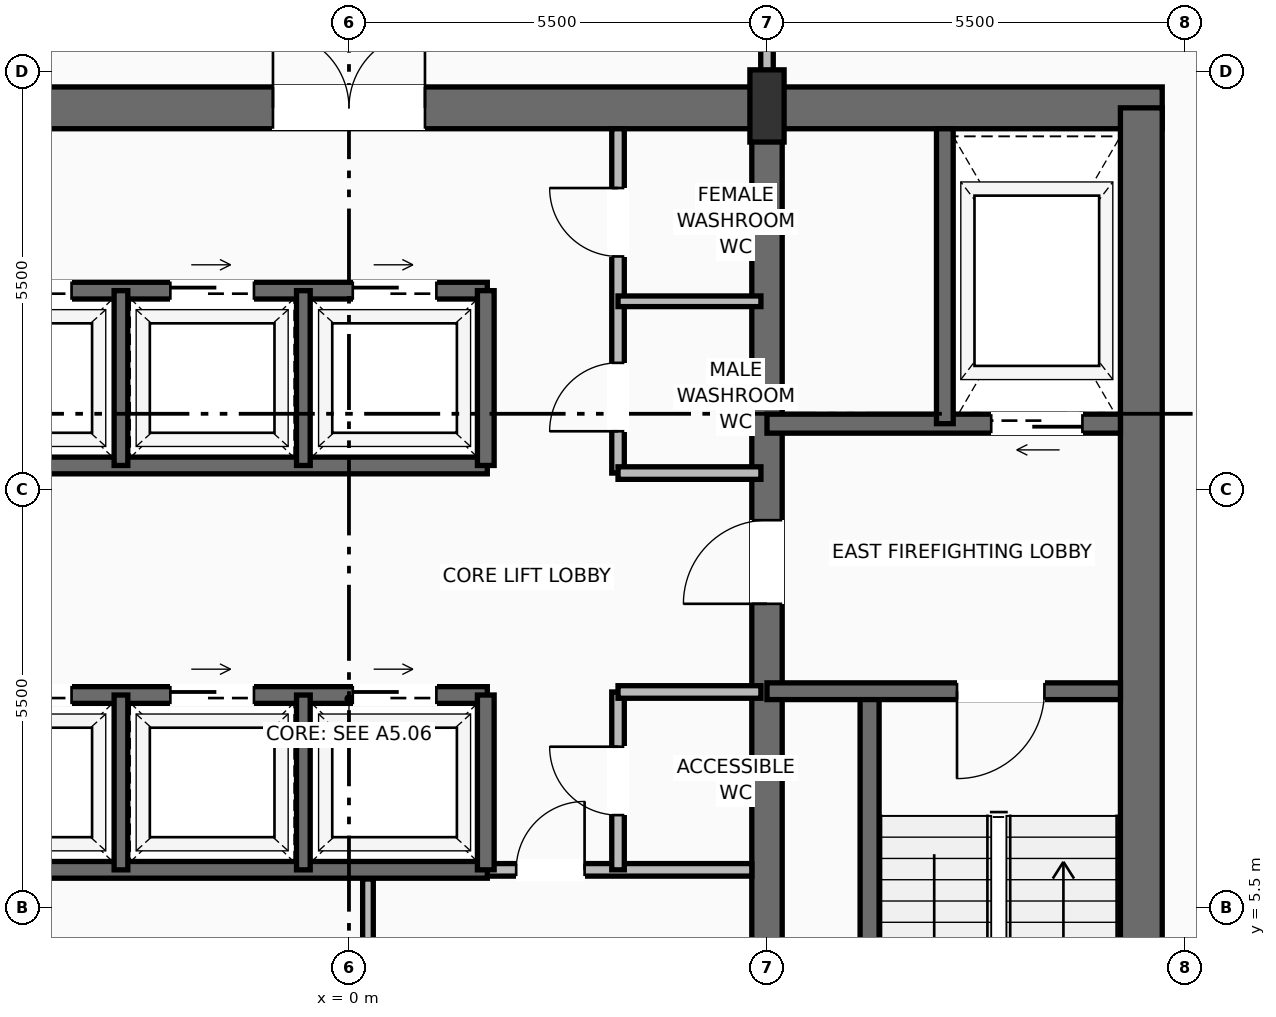
"""IFC4 building model, lengths in metres.
Left out: names, types, materials, properties, quantities, classifications, styles, units other than length and angle.
Written with IfcOpenShell. Run it as: python <this file> out.ifc"""

import sys

from ifc_helpers import new_model, si_unit, direction, frame, frame_2d, origin, origin_2d, place, context, subcontext, project, spatial, rectangle, extrude, source, transform, mapped, element, fill, save


model = new_model("IFC4")
c1 = context("Model", 3, precision=1e-05, world=origin(), true_north=direction((0.0, 1.0)))
c2 = subcontext(c1, "Body", "Model", "MODEL_VIEW")
j1 = project(units=[si_unit("LENGTHUNIT", "METRE"), si_unit("PLANEANGLEUNIT", "RADIAN")], contexts=[c1])
p1 = place(None, origin())
s1 = spatial("IfcSite", under=j1, at=p1, CompositionType="ELEMENT")
p2 = place(p1, origin())
s2 = spatial("IfcBuilding", under=s1, at=p2, CompositionType="ELEMENT")
p3 = place(p2, frame((0.0, 0.0, 215.4)))
s3 = spatial("IfcBuildingStorey", under=s2, at=p3, CompositionType="ELEMENT", Elevation=215.4)
p4 = place(p3, frame((-10.7, 16.025, 0.0), z_axis=(0.0, 0.0, 1.0), x_axis=(1.0, 0.0, 0.0)))
e1 = element("IfcWall", 1, at=p4, inside=s3, PredefinedType="SHEAR", context=c2, shape_type="SweptSolid", body=[
    extrude(rectangle(XDim=21.4, YDim=0.55, at=frame_2d((10.7, 0.0))), origin(), (0.0, 0.0, 1.0), 4.39),
])
p5 = place(p4, frame((3.27, 0.0, 0.0)))
e2 = element("IfcOpeningElement", 2, at=p5, cuts=e1, PredefinedType="OPENING", context=c2, shape_type="SweptSolid", body=[
    extrude(rectangle(XDim=1.3, YDim=2.3, at=frame_2d((0.65, 1.15))), frame((0.0, 0.285, 0.0), z_axis=(0.0, -1.0, 0.0), x_axis=(1.0, 0.0, 0.0)), (0.0, 0.0, 1.0), 0.57),
])
p6 = place(p4, frame((9.7, 0.0, 0.0)))
e3 = element("IfcOpeningElement", 3, at=p6, cuts=e1, PredefinedType="OPENING", context=c2, shape_type="SweptSolid", body=[
    extrude(rectangle(XDim=2.0, YDim=2.4, at=frame_2d((1.0, 1.2))), frame((0.0, 0.285, 0.0), z_axis=(0.0, -1.0, 0.0), x_axis=(1.0, 0.0, 0.0)), (0.0, 0.0, 1.0), 0.57),
])
p7 = place(p3, frame((10.425, 0.575, 0.0), z_axis=(0.0, 0.0, 1.0), x_axis=(0.0, 1.0, 0.0)))
e4 = element("IfcWall", 4, at=p7, inside=s3, PredefinedType="SHEAR", context=c2, shape_type="SweptSolid", body=[
    extrude(rectangle(XDim=15.45, YDim=0.55, at=frame_2d((7.725, 0.0))), origin(), (0.0, 0.0, 1.0), 4.39),
])
p8 = place(p3, frame((5.5, 0.575, 0.0), z_axis=(0.0, 0.0, 1.0), x_axis=(0.0, 1.0, 0.0)))
e5 = element("IfcWall", 5, at=p8, inside=s3, PredefinedType="SHEAR", context=c2, shape_type="SweptSolid", body=[
    extrude(rectangle(XDim=15.45, YDim=0.4, at=frame_2d((7.725, 0.0))), origin(), (0.0, 0.0, 1.0), 4.39),
])
p9 = place(p8, frame((8.925, 0.0, 0.0)))
e6 = element("IfcOpeningElement", 6, at=p9, cuts=e5, PredefinedType="OPENING", context=c2, shape_type="SweptSolid", body=[
    extrude(rectangle(XDim=1.1, YDim=2.2, at=frame_2d((0.55, 1.1))), frame((0.0, 0.21, 0.0), z_axis=(0.0, -1.0, 0.0), x_axis=(1.0, 0.0, 0.0)), (0.0, 0.0, 1.0), 0.42),
])
m1 = source(origin(), c2, "Body", "SweptSolid", [
    extrude(rectangle(XDim=0.45, YDim=0.95, at=origin_2d()), origin(), (0.0, 0.0, 1.0), 4.6),
])
p10 = place(p3, frame((5.5, 16.05, 0.0), z_axis=(0.0, 0.0, 1.0), x_axis=(1.0, 0.0, 0.0)))
e7 = element("IfcColumn", 7, at=p10, inside=s3, PredefinedType="PILASTER", context=c2, shape_type="MappedRepresentation", body=[
    mapped(m1, transform((0.0, 0.0, 0.0), scale=1.0)),
])
p11 = place(p3, frame((9.102, 32.238, 0.0), z_axis=(0.0, 0.0, 1.0), x_axis=(0.531549047002, -0.847027514684, 0.0)))
e8 = element("IfcWall", 8, at=p11, inside=s3, PredefinedType="SOLIDWALL", context=c2, shape_type="SweptSolid", body=[
    extrude(rectangle(XDim=19.313, YDim=0.28, at=frame_2d((9.657, 0.0))), origin(), (0.0, 0.0, 1.0), 3.97),
])
p12 = place(p11, frame((4.635, 0.0, 0.0)))
e9 = element("IfcOpeningElement", 9, at=p12, cuts=e8, PredefinedType="OPENING", context=c2, shape_type="SweptSolid", body=[
    extrude(rectangle(XDim=1.6, YDim=2.35, at=frame_2d((0.8, 1.175))), frame((0.0, 0.15, 0.0), z_axis=(0.0, -1.0, 0.0), x_axis=(1.0, 0.0, 0.0)), (0.0, 0.0, 1.0), 0.3),
])
p13 = place(p11, frame((13.133, 0.0, 0.9)))
e10 = element("IfcOpeningElement", 10, at=p13, cuts=e8, PredefinedType="OPENING", context=c2, shape_type="SweptSolid", body=[
    extrude(rectangle(XDim=2.0, YDim=1.55, at=frame_2d((1.0, 0.775))), frame((0.0, 0.15, 0.0), z_axis=(0.0, -1.0, 0.0), x_axis=(1.0, 0.0, 0.0)), (0.0, 0.0, 1.0), 0.3),
])
p14 = place(p3, frame((6.85, 0.85, 0.0), z_axis=(0.0, 0.0, 1.0), x_axis=(0.0, 1.0, 0.0)))
e11 = element("IfcWall", 11, at=p14, inside=s3, PredefinedType="SOLIDWALL", context=c2, shape_type="SweptSolid", body=[
    extrude(rectangle(XDim=7.5, YDim=0.25, at=frame_2d((3.75, 0.0))), origin(), (0.0, 0.0, 1.0), 4.39),
])
p15 = place(p3, frame((10.15, 8.35, 0.0), z_axis=(0.0, 0.0, 1.0), x_axis=(-1.0, 0.0, 0.0)))
e12 = element("IfcWall", 12, at=p15, inside=s3, PredefinedType="SOLIDWALL", context=c2, shape_type="SweptSolid", body=[
    extrude(rectangle(XDim=4.65, YDim=0.22, at=frame_2d((2.325, 0.0))), origin(), (0.0, 0.0, 1.0), 4.39),
])
p16 = place(p15, frame((1.0, 0.0, 0.0)))
e13 = element("IfcOpeningElement", 13, at=p16, cuts=e12, PredefinedType="OPENING", context=c2, shape_type="SweptSolid", body=[
    extrude(rectangle(XDim=1.15, YDim=2.2, at=frame_2d((0.575, 1.1))), frame((0.0, 0.12, 0.0), z_axis=(0.0, -1.0, 0.0), x_axis=(1.0, 0.0, 0.0)), (0.0, 0.0, 1.0), 0.24),
])
p17 = place(p3, frame((10.15, 11.87, 0.0), z_axis=(0.0, 0.0, 1.0), x_axis=(-1.0, 0.0, 0.0)))
e14 = element("IfcWall", 14, at=p17, inside=s3, PredefinedType="SOLIDWALL", context=c2, shape_type="SweptSolid", body=[
    extrude(rectangle(XDim=4.65, YDim=0.25, at=frame_2d((2.325, 0.0))), origin(), (0.0, 0.0, 1.0), 4.39),
])
p18 = place(p17, frame((0.5, 0.0, 0.0)))
e15 = element("IfcOpeningElement", 15, at=p18, cuts=e14, PredefinedType="OPENING", context=c2, shape_type="SweptSolid", body=[
    extrude(rectangle(XDim=1.2, YDim=2.25, at=frame_2d((0.6, 1.125))), frame((0.0, 0.135, 0.0), z_axis=(0.0, -1.0, 0.0), x_axis=(1.0, 0.0, 0.0)), (0.0, 0.0, 1.0), 0.27),
])
p19 = place(p3, frame((7.84, 11.87, 0.0), z_axis=(0.0, 0.0, 1.0), x_axis=(0.0, 1.0, 0.0)))
e16 = element("IfcWall", 16, at=p19, inside=s3, PredefinedType="SOLIDWALL", context=c2, shape_type="SweptSolid", body=[
    extrude(rectangle(XDim=3.88, YDim=0.22, at=frame_2d((1.94, 0.0))), origin(), (0.0, 0.0, 1.0), 4.39),
])
p20 = place(p3, frame((1.82, 6.0, 0.0), z_axis=(0.0, 0.0, 1.0), x_axis=(1.0, 0.0, 0.0)))
e17 = element("IfcWall", 17, at=p20, inside=s3, PredefinedType="PARTITIONING", context=c2, shape_type="SweptSolid", body=[
    extrude(rectangle(XDim=3.48, YDim=0.165, at=frame_2d((1.74, 0.0))), origin(), (0.0, 0.0, 1.0), 4.382),
])
p21 = place(p20, frame((0.38, 0.0, 0.0)))
e18 = element("IfcOpeningElement", 18, at=p21, cuts=e17, PredefinedType="OPENING", context=c2, shape_type="SweptSolid", body=[
    extrude(rectangle(XDim=0.9, YDim=2.1, at=frame_2d((0.45, 1.05))), frame((0.0, 0.093, 0.0), z_axis=(0.0, -1.0, 0.0), x_axis=(1.0, 0.0, 0.0)), (0.0, 0.0, 1.0), 0.185),
])
p22 = place(p3, frame((0.25, 0.85, 0.0), z_axis=(0.0, 0.0, 1.0), x_axis=(0.0, 1.0, 0.0)))
e19 = element("IfcWall", 19, at=p22, inside=s3, PredefinedType="PARTITIONING", context=c2, shape_type="SweptSolid", body=[
    extrude(rectangle(XDim=5.03, YDim=0.14, at=frame_2d((2.515, 0.0))), origin(), (0.0, 0.0, 1.0), 4.382),
])
p23 = place(p22, frame((2.1, 0.0, 0.0)))
e20 = element("IfcOpeningElement", 20, at=p23, cuts=e19, PredefinedType="OPENING", context=c2, shape_type="SweptSolid", body=[
    extrude(rectangle(XDim=0.9, YDim=2.1, at=frame_2d((0.45, 1.05))), frame((0.0, 0.08, 0.0), z_axis=(0.0, -1.0, 0.0), x_axis=(1.0, 0.0, 0.0)), (0.0, 0.0, 1.0), 0.16),
])
p24 = place(p3, frame((3.54, 6.0, 0.0), z_axis=(0.0, 0.0, 1.0), x_axis=(0.0, 1.0, 0.0)))
e21 = element("IfcWall", 21, at=p24, inside=s3, PredefinedType="PARTITIONING", context=c2, shape_type="SweptSolid", body=[
    extrude(rectangle(XDim=2.34, YDim=0.165, at=frame_2d((1.17, 0.0))), origin(), (0.0, 0.0, 1.0), 4.382),
])
p25 = place(p24, frame((0.72, 0.0, 0.0)))
e22 = element("IfcOpeningElement", 22, at=p25, cuts=e21, PredefinedType="OPENING", context=c2, shape_type="SweptSolid", body=[
    extrude(rectangle(XDim=0.9, YDim=2.1, at=frame_2d((0.45, 1.05))), frame((0.0, 0.093, 0.0), z_axis=(0.0, -1.0, 0.0), x_axis=(1.0, 0.0, 0.0)), (0.0, 0.0, 1.0), 0.185),
])
p26 = place(p3, frame((3.54, 8.34, 0.0), z_axis=(0.0, 0.0, 1.0), x_axis=(1.0, 0.0, 0.0)))
e23 = element("IfcWall", 23, at=p26, inside=s3, PredefinedType="PARTITIONING", context=c2, shape_type="SweptSolid", body=[
    extrude(rectangle(XDim=1.88, YDim=0.165, at=frame_2d((0.94, 0.0))), origin(), (0.0, 0.0, 1.0), 4.382),
])
p27 = place(p3, frame((-5.5, 6.0, 0.0), z_axis=(0.0, 0.0, 1.0), x_axis=(1.0, 0.0, 0.0)))
e24 = element("IfcWall", 24, at=p27, inside=s3, PredefinedType="SOLIDWALL", context=c2, shape_type="SweptSolid", body=[
    extrude(rectangle(XDim=7.32, YDim=0.22, at=frame_2d((3.66, 0.0))), origin(), (0.0, 0.0, 1.0), 4.39),
])
p28 = place(p3, frame((-5.5, 8.3, 0.0), z_axis=(0.0, 0.0, 1.0), x_axis=(1.0, 0.0, 0.0)))
e25 = element("IfcWall", 25, at=p28, inside=s3, PredefinedType="SOLIDWALL", context=c2, shape_type="SweptSolid", body=[
    extrude(rectangle(XDim=7.32, YDim=0.22, at=frame_2d((3.66, 0.0))), origin(), (0.0, 0.0, 1.0), 4.39),
])
p29 = place(p28, frame((0.75, 0.0, 0.0)))
e26 = element("IfcOpeningElement", 26, at=p29, cuts=e25, PredefinedType="OPENING", context=c2, shape_type="SweptSolid", body=[
    extrude(rectangle(XDim=1.1, YDim=2.2, at=frame_2d((0.55, 1.1))), frame((0.0, 0.12, 0.0), z_axis=(0.0, -1.0, 0.0), x_axis=(1.0, 0.0, 0.0)), (0.0, 0.0, 1.0), 0.24),
])
p30 = place(p28, frame((3.15, 0.0, 0.0)))
e27 = element("IfcOpeningElement", 27, at=p30, cuts=e25, PredefinedType="OPENING", context=c2, shape_type="SweptSolid", body=[
    extrude(rectangle(XDim=1.1, YDim=2.2, at=frame_2d((0.55, 1.1))), frame((0.0, 0.12, 0.0), z_axis=(0.0, -1.0, 0.0), x_axis=(1.0, 0.0, 0.0)), (0.0, 0.0, 1.0), 0.24),
])
p31 = place(p28, frame((5.55, 0.0, 0.0)))
e28 = element("IfcOpeningElement", 28, at=p31, cuts=e25, PredefinedType="OPENING", context=c2, shape_type="SweptSolid", body=[
    extrude(rectangle(XDim=1.1, YDim=2.2, at=frame_2d((0.55, 1.1))), frame((0.0, 0.12, 0.0), z_axis=(0.0, -1.0, 0.0), x_axis=(1.0, 0.0, 0.0)), (0.0, 0.0, 1.0), 0.24),
])
p32 = place(p3, frame((1.8, 6.0, 0.0), z_axis=(0.0, 0.0, 1.0), x_axis=(0.0, 1.0, 0.0)))
e29 = element("IfcWall", 29, at=p32, inside=s3, PredefinedType="SOLIDWALL", context=c2, shape_type="SweptSolid", body=[
    extrude(rectangle(XDim=2.3, YDim=0.22, at=frame_2d((1.15, 0.0))), origin(), (0.0, 0.0, 1.0), 4.39),
])
for number, where, z_axis, x_axis in (
    (30, (-3.0, 6.0, 0.0), (0.0, 0.0, 1.0), (0.0, 1.0, 0.0)),
    (31, (-0.6, 6.0, 0.0), (0.0, 0.0, 1.0), (0.0, 1.0, 0.0)),
):
    element("IfcWall", number, at=place(p3, frame(where, z_axis=z_axis, x_axis=x_axis)), inside=s3, PredefinedType="SOLIDWALL", context=c2, shape_type="SweptSolid", body=[
        extrude(rectangle(XDim=2.3, YDim=0.18, at=frame_2d((1.15, 0.0))), origin(), (0.0, 0.0, 1.0), 4.39),
    ])
p33 = place(p3, frame((-5.5, 11.32, 0.0), z_axis=(0.0, 0.0, 1.0), x_axis=(1.0, 0.0, 0.0)))
e32 = element("IfcWall", 32, at=p33, inside=s3, PredefinedType="SOLIDWALL", context=c2, shape_type="SweptSolid", body=[
    extrude(rectangle(XDim=7.32, YDim=0.22, at=frame_2d((3.66, 0.0))), origin(), (0.0, 0.0, 1.0), 4.39),
])
p34 = place(p3, frame((-5.5, 13.62, 0.0), z_axis=(0.0, 0.0, 1.0), x_axis=(1.0, 0.0, 0.0)))
e33 = element("IfcWall", 33, at=p34, inside=s3, PredefinedType="SOLIDWALL", context=c2, shape_type="SweptSolid", body=[
    extrude(rectangle(XDim=7.32, YDim=0.22, at=frame_2d((3.66, 0.0))), origin(), (0.0, 0.0, 1.0), 4.39),
])
p35 = place(p34, frame((0.75, 0.0, 0.0)))
e34 = element("IfcOpeningElement", 34, at=p35, cuts=e33, PredefinedType="OPENING", context=c2, shape_type="SweptSolid", body=[
    extrude(rectangle(XDim=1.1, YDim=2.2, at=frame_2d((0.55, 1.1))), frame((0.0, 0.12, 0.0), z_axis=(0.0, -1.0, 0.0), x_axis=(1.0, 0.0, 0.0)), (0.0, 0.0, 1.0), 0.24),
])
p36 = place(p34, frame((3.15, 0.0, 0.0)))
e35 = element("IfcOpeningElement", 35, at=p36, cuts=e33, PredefinedType="OPENING", context=c2, shape_type="SweptSolid", body=[
    extrude(rectangle(XDim=1.1, YDim=2.2, at=frame_2d((0.55, 1.1))), frame((0.0, 0.12, 0.0), z_axis=(0.0, -1.0, 0.0), x_axis=(1.0, 0.0, 0.0)), (0.0, 0.0, 1.0), 0.24),
])
p37 = place(p34, frame((5.55, 0.0, 0.0)))
e36 = element("IfcOpeningElement", 36, at=p37, cuts=e33, PredefinedType="OPENING", context=c2, shape_type="SweptSolid", body=[
    extrude(rectangle(XDim=1.1, YDim=2.2, at=frame_2d((0.55, 1.1))), frame((0.0, 0.12, 0.0), z_axis=(0.0, -1.0, 0.0), x_axis=(1.0, 0.0, 0.0)), (0.0, 0.0, 1.0), 0.24),
])
p38 = place(p3, frame((1.8, 11.32, 0.0), z_axis=(0.0, 0.0, 1.0), x_axis=(0.0, 1.0, 0.0)))
e37 = element("IfcWall", 37, at=p38, inside=s3, PredefinedType="SOLIDWALL", context=c2, shape_type="SweptSolid", body=[
    extrude(rectangle(XDim=2.3, YDim=0.22, at=frame_2d((1.15, 0.0))), origin(), (0.0, 0.0, 1.0), 4.39),
])
for number, where, z_axis, x_axis in (
    (38, (-3.0, 11.32, 0.0), (0.0, 0.0, 1.0), (0.0, 1.0, 0.0)),
    (39, (-0.6, 11.32, 0.0), (0.0, 0.0, 1.0), (0.0, 1.0, 0.0)),
):
    element("IfcWall", number, at=place(p3, frame(where, z_axis=z_axis, x_axis=x_axis)), inside=s3, PredefinedType="SOLIDWALL", context=c2, shape_type="SweptSolid", body=[
        extrude(rectangle(XDim=2.3, YDim=0.18, at=frame_2d((1.15, 0.0))), origin(), (0.0, 0.0, 1.0), 4.39),
    ])
p39 = place(p3, frame((3.54, 11.22, 0.0), z_axis=(0.0, 0.0, 1.0), x_axis=(0.0, 1.0, 0.0)))
e40 = element("IfcWall", 40, at=p39, inside=s3, PredefinedType="PARTITIONING", context=c2, shape_type="SweptSolid", body=[
    extrude(rectangle(XDim=4.53, YDim=0.165, at=frame_2d((2.265, 0.0))), origin(), (0.0, 0.0, 1.0), 4.382),
])
p40 = place(p39, frame((0.55, 0.0, 0.0)))
e41 = element("IfcOpeningElement", 41, at=p40, cuts=e40, PredefinedType="OPENING", context=c2, shape_type="SweptSolid", body=[
    extrude(rectangle(XDim=0.9, YDim=2.1, at=frame_2d((0.45, 1.05))), frame((0.0, 0.093, 0.0), z_axis=(0.0, -1.0, 0.0), x_axis=(1.0, 0.0, 0.0)), (0.0, 0.0, 1.0), 0.185),
])
p41 = place(p39, frame((2.85, 0.0, 0.0)))
e42 = element("IfcOpeningElement", 42, at=p41, cuts=e40, PredefinedType="OPENING", context=c2, shape_type="SweptSolid", body=[
    extrude(rectangle(XDim=0.9, YDim=2.1, at=frame_2d((0.45, 1.05))), frame((0.0, 0.093, 0.0), z_axis=(0.0, -1.0, 0.0), x_axis=(1.0, 0.0, 0.0)), (0.0, 0.0, 1.0), 0.185),
])
p42 = place(p3, frame((3.54, 11.22, 0.0), z_axis=(0.0, 0.0, 1.0), x_axis=(1.0, 0.0, 0.0)))
e43 = element("IfcWall", 43, at=p42, inside=s3, PredefinedType="PARTITIONING", context=c2, shape_type="SweptSolid", body=[
    extrude(rectangle(XDim=1.88, YDim=0.165, at=frame_2d((0.94, 0.0))), origin(), (0.0, 0.0, 1.0), 4.382),
])
p43 = place(p3, frame((3.54, 13.48, 0.0), z_axis=(0.0, 0.0, 1.0), x_axis=(1.0, 0.0, 0.0)))
e44 = element("IfcWall", 44, at=p43, inside=s3, PredefinedType="PARTITIONING", context=c2, shape_type="SweptSolid", body=[
    extrude(rectangle(XDim=1.88, YDim=0.14, at=frame_2d((0.94, 0.0))), origin(), (0.0, 0.0, 1.0), 4.382),
])
p44 = place(p3, frame((5.5, 16.32, 0.0), z_axis=(0.0, 0.0, 1.0), x_axis=(0.0, 1.0, 0.0)))
e45 = element("IfcWall", 45, at=p44, inside=s3, PredefinedType="PARTITIONING", context=c2, shape_type="SweptSolid", body=[
    extrude(rectangle(XDim=21.902, YDim=0.165, at=frame_2d((10.951, 0.0))), origin(), (0.0, 0.0, 1.0), 3.833),
])
p45 = place(p44, frame((4.896, 0.0, 0.0)))
e46 = element("IfcOpeningElement", 46, at=p45, cuts=e45, PredefinedType="OPENING", context=c2, shape_type="SweptSolid", body=[
    extrude(rectangle(XDim=1.5, YDim=2.25, at=frame_2d((0.75, 1.125))), frame((0.0, 0.093, 0.0), z_axis=(0.0, -1.0, 0.0), x_axis=(1.0, 0.0, 0.0)), (0.0, 0.0, 1.0), 0.185),
])
m2 = source(origin(), c2, "Body", "SweptSolid", [
    extrude(rectangle(XDim=1.15, YDim=2.2, at=frame_2d((0.575, 1.1))), frame((0.0, 0.025, 0.0), z_axis=(0.0, -1.0, 0.0), x_axis=(1.0, 0.0, 0.0)), (0.0, 0.0, 1.0), 0.05),
])
p46 = place(p16, origin())
e47 = element("IfcDoor", 47, at=p46, inside=s3, OperationType="SINGLE_SWING_RIGHT", PredefinedType="DOOR", context=c2, shape_type="MappedRepresentation", body=[
    mapped(m2, transform((0.0, 0.0, 0.0), scale=1.0)),
])
fill(e13, e47)
m3 = source(origin(), c2, "Body", "SweptSolid", [
    extrude(rectangle(XDim=1.1, YDim=2.2, at=frame_2d((0.55, 1.1))), frame((0.0, 0.025, 0.0), z_axis=(0.0, -1.0, 0.0), x_axis=(1.0, 0.0, 0.0)), (0.0, 0.0, 1.0), 0.05),
])
p47 = place(p9, origin())
e48 = element("IfcDoor", 48, at=p47, inside=s3, OperationType="SINGLE_SWING_LEFT", PredefinedType="DOOR", context=c2, shape_type="MappedRepresentation", body=[
    mapped(m3, transform((0.0, 0.0, 0.0), scale=1.0)),
])
fill(e6, e48)
m4 = source(origin(), c2, "Body", "SweptSolid", [
    extrude(rectangle(XDim=1.2, YDim=2.25, at=frame_2d((0.6, 1.125))), frame((0.0, 0.025, 0.0), z_axis=(0.0, -1.0, 0.0), x_axis=(1.0, 0.0, 0.0)), (0.0, 0.0, 1.0), 0.05),
])
p48 = place(p18, origin())
e49 = element("IfcDoor", 49, at=p48, inside=s3, OperationType="SLIDING_TO_RIGHT", PredefinedType="DOOR", context=c2, shape_type="MappedRepresentation", body=[
    mapped(m4, transform((0.0, 0.0, 0.0), scale=1.0)),
])
fill(e15, e49)
m5 = source(origin(), c2, "Body", "SweptSolid", [
    extrude(rectangle(XDim=2.0, YDim=2.4, at=frame_2d((1.0, 1.2))), frame((0.0, 0.025, 0.0), z_axis=(0.0, -1.0, 0.0), x_axis=(1.0, 0.0, 0.0)), (0.0, 0.0, 1.0), 0.05),
])
p49 = place(p6, origin())
e50 = element("IfcDoor", 50, at=p49, inside=s3, OperationType="DOUBLE_DOOR_SINGLE_SWING", PredefinedType="DOOR", context=c2, shape_type="MappedRepresentation", body=[
    mapped(m5, transform((0.0, 0.0, 0.0), scale=1.0)),
])
fill(e3, e50)
m6 = source(origin(), c2, "Body", "SweptSolid", [
    extrude(rectangle(XDim=0.9, YDim=2.1, at=frame_2d((0.45, 1.05))), frame((0.0, 0.025, 0.0), z_axis=(0.0, -1.0, 0.0), x_axis=(1.0, 0.0, 0.0)), (0.0, 0.0, 1.0), 0.05),
])
p50 = place(p21, origin())
e51 = element("IfcDoor", 51, at=p50, inside=s3, OperationType="SINGLE_SWING_RIGHT", PredefinedType="DOOR", context=c2, shape_type="MappedRepresentation", body=[
    mapped(m6, transform((0.0, 0.0, 0.0), scale=1.0)),
])
fill(e18, e51)
p51 = place(p25, origin())
e52 = element("IfcDoor", 52, at=p51, inside=s3, OperationType="SINGLE_SWING_RIGHT", PredefinedType="DOOR", context=c2, shape_type="MappedRepresentation", body=[
    mapped(m6, transform((0.0, 0.0, 0.0), scale=1.0)),
])
fill(e22, e52)
m7 = source(origin(), c2, "Body", "SweptSolid", [
    extrude(rectangle(XDim=1.1, YDim=2.2, at=frame_2d((0.55, 1.1))), frame((0.0, 0.025, 0.0), z_axis=(0.0, -1.0, 0.0), x_axis=(1.0, 0.0, 0.0)), (0.0, 0.0, 1.0), 0.05),
])
p52 = place(p29, origin())
e53 = element("IfcDoor", 53, at=p52, inside=s3, OperationType="SLIDING_TO_LEFT", PredefinedType="DOOR", context=c2, shape_type="MappedRepresentation", body=[
    mapped(m7, transform((0.0, 0.0, 0.0), scale=1.0)),
])
fill(e26, e53)
p53 = place(p30, origin())
e54 = element("IfcDoor", 54, at=p53, inside=s3, OperationType="SLIDING_TO_LEFT", PredefinedType="DOOR", context=c2, shape_type="MappedRepresentation", body=[
    mapped(m7, transform((0.0, 0.0, 0.0), scale=1.0)),
])
fill(e27, e54)
p54 = place(p31, origin())
e55 = element("IfcDoor", 55, at=p54, inside=s3, OperationType="SLIDING_TO_LEFT", PredefinedType="DOOR", context=c2, shape_type="MappedRepresentation", body=[
    mapped(m7, transform((0.0, 0.0, 0.0), scale=1.0)),
])
fill(e28, e55)
p55 = place(p35, origin())
e56 = element("IfcDoor", 56, at=p55, inside=s3, OperationType="SLIDING_TO_RIGHT", PredefinedType="DOOR", context=c2, shape_type="MappedRepresentation", body=[
    mapped(m7, transform((0.0, 0.0, 0.0), scale=1.0)),
])
fill(e34, e56)
p56 = place(p36, origin())
e57 = element("IfcDoor", 57, at=p56, inside=s3, OperationType="SLIDING_TO_RIGHT", PredefinedType="DOOR", context=c2, shape_type="MappedRepresentation", body=[
    mapped(m7, transform((0.0, 0.0, 0.0), scale=1.0)),
])
fill(e35, e57)
p57 = place(p37, origin())
e58 = element("IfcDoor", 58, at=p57, inside=s3, OperationType="SLIDING_TO_RIGHT", PredefinedType="DOOR", context=c2, shape_type="MappedRepresentation", body=[
    mapped(m7, transform((0.0, 0.0, 0.0), scale=1.0)),
])
fill(e36, e58)
p58 = place(p40, origin())
e59 = element("IfcDoor", 59, at=p58, inside=s3, OperationType="SINGLE_SWING_LEFT", PredefinedType="DOOR", context=c2, shape_type="MappedRepresentation", body=[
    mapped(m6, transform((0.0, 0.0, 0.0), scale=1.0)),
])
fill(e41, e59)
p59 = place(p41, origin())
e60 = element("IfcDoor", 60, at=p59, inside=s3, OperationType="SINGLE_SWING_RIGHT", PredefinedType="DOOR", context=c2, shape_type="MappedRepresentation", body=[
    mapped(m6, transform((0.0, 0.0, 0.0), scale=1.0)),
])
fill(e42, e60)
save(model, sys.argv[1])
